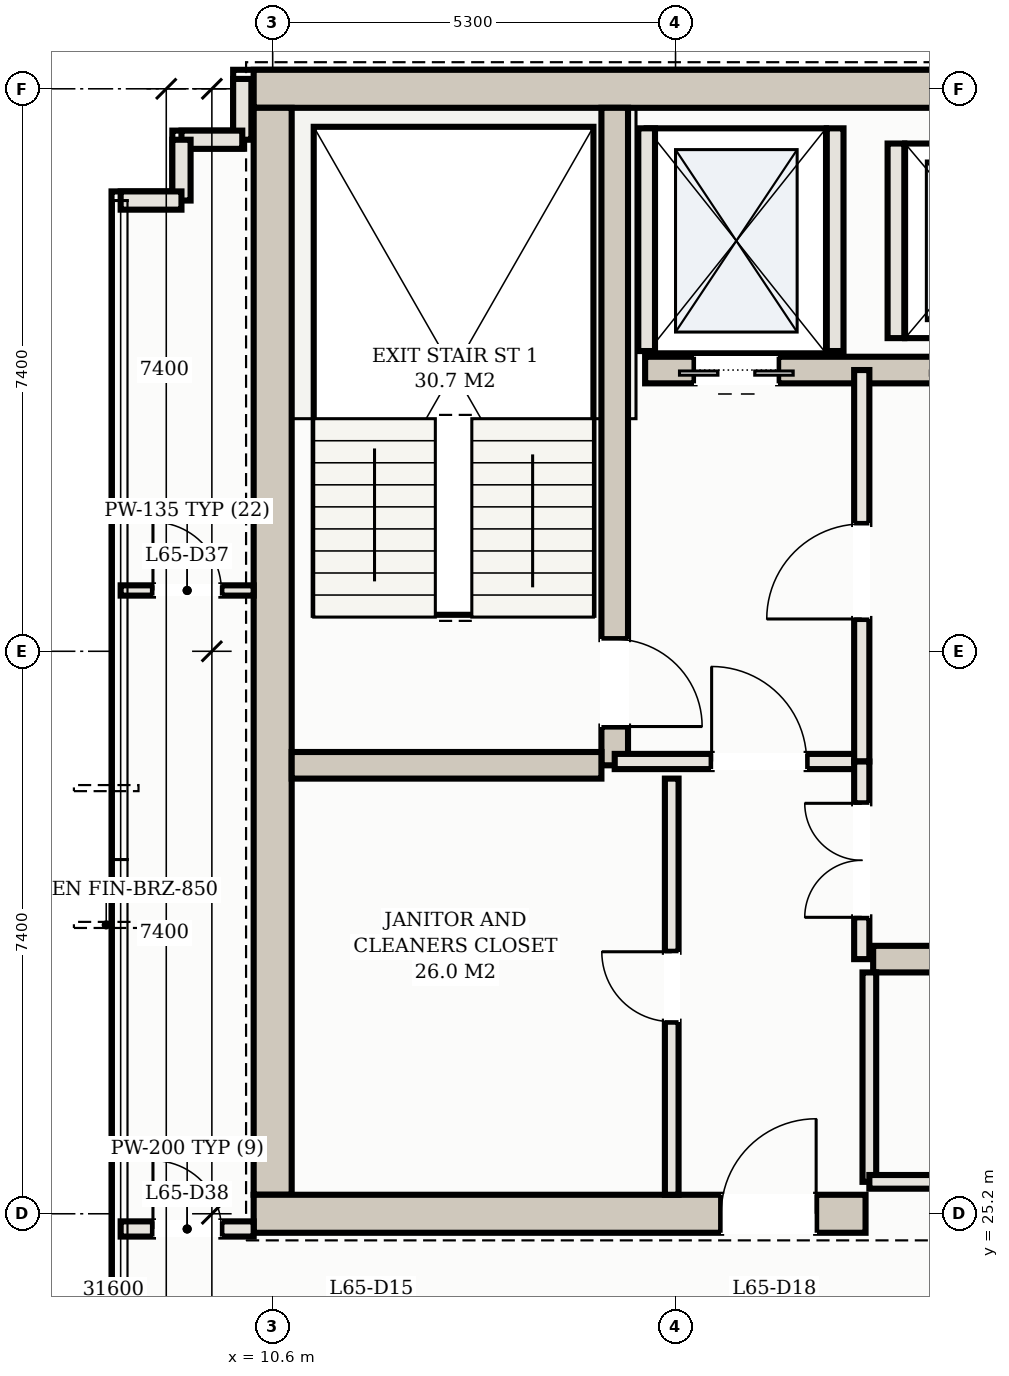
"""IFC4 building model, lengths in metres.
Left out: names, types, materials, properties, quantities, classifications, styles, units other than length and angle.
Written with IfcOpenShell. Run it as: python <this file> out.ifc"""

import sys

from ifc_helpers import new_model, si_unit, direction, frame, frame_2d, origin, place, context, subcontext, project, spatial, rectangle, extrude, element, fill, save


model = new_model("IFC4")
c1 = context("Model", 3, precision=1e-05, world=origin(), true_north=direction((0.0, 1.0)))
c2 = subcontext(c1, "Body", "Model", "MODEL_VIEW")
j1 = project(units=[si_unit("LENGTHUNIT", "METRE"), si_unit("PLANEANGLEUNIT", "RADIAN")], contexts=[c1])
p1 = place(None, origin())
s1 = spatial("IfcSite", under=j1, at=p1, CompositionType="ELEMENT")
p2 = place(p1, origin())
s2 = spatial("IfcBuilding", under=s1, at=p2, CompositionType="ELEMENT")
p3 = place(p2, frame((0.0, 0.0, 236.3)))
s3 = spatial("IfcBuildingStorey", under=s2, at=p3, CompositionType="ELEMENT", Elevation=236.3)
p4 = place(p3, frame((10.35, 40.0, 0.0), z_axis=(0.0, 0.0, 1.0), x_axis=(1.0, 0.0, 0.0)))
e1 = element("IfcWall", 1, at=p4, inside=s3, PredefinedType="SHEAR", context=c2, shape_type="SweptSolid", body=[
    extrude(rectangle(XDim=32.3, YDim=0.5, at=frame_2d((16.15, 0.0))), origin(), (0.0, 0.0, 1.0), 3.11),
])
p5 = place(p3, frame((10.6, 25.45, 0.0), z_axis=(0.0, 0.0, 1.0), x_axis=(0.0, 1.0, 0.0)))
e2 = element("IfcWall", 2, at=p5, inside=s3, PredefinedType="SHEAR", context=c2, shape_type="SweptSolid", body=[
    extrude(rectangle(XDim=14.3, YDim=0.5, at=frame_2d((7.15, 0.0))), origin(), (0.0, 0.0, 1.0), 3.11),
])
p6 = place(p3, frame((10.35, 25.2, 0.0), z_axis=(0.0, 0.0, 1.0), x_axis=(1.0, 0.0, 0.0)))
e3 = element("IfcWall", 3, at=p6, inside=s3, PredefinedType="SHEAR", context=c2, shape_type="SweptSolid", body=[
    extrude(rectangle(XDim=8.05, YDim=0.5, at=frame_2d((4.025, 0.0))), origin(), (0.0, 0.0, 1.0), 3.11),
])
p7 = place(p6, frame((6.15, 0.0, 0.0)))
e4 = element("IfcOpeningElement", 4, at=p7, cuts=e3, PredefinedType="OPENING", context=c2, shape_type="SweptSolid", body=[
    extrude(rectangle(XDim=1.25, YDim=2.2, at=frame_2d((0.625, 1.1))), frame((0.0, 0.26, 0.0), z_axis=(0.0, -1.0, 0.0), x_axis=(1.0, 0.0, 0.0)), (0.0, 0.0, 1.0), 0.52),
])
p8 = place(p3, frame((15.1, 31.1, 0.0), z_axis=(0.0, 0.0, 1.0), x_axis=(0.0, 1.0, 0.0)))
e5 = element("IfcWall", 5, at=p8, inside=s3, PredefinedType="SHEAR", context=c2, shape_type="SweptSolid", body=[
    extrude(rectangle(XDim=8.65, YDim=0.35, at=frame_2d((4.325, 0.0))), origin(), (0.0, 0.0, 1.0), 3.11),
])
p9 = place(p8, frame((0.51, 0.0, 0.0)))
e6 = element("IfcOpeningElement", 6, at=p9, cuts=e5, PredefinedType="OPENING", context=c2, shape_type="SweptSolid", body=[
    extrude(rectangle(XDim=1.15, YDim=2.2, at=frame_2d((0.575, 1.1))), frame((0.0, 0.185, 0.0), z_axis=(0.0, -1.0, 0.0), x_axis=(1.0, 0.0, 0.0)), (0.0, 0.0, 1.0), 0.37),
])
p10 = place(p3, frame((10.85, 31.1, 0.0), z_axis=(0.0, 0.0, 1.0), x_axis=(1.0, 0.0, 0.0)))
e7 = element("IfcWall", 7, at=p10, inside=s3, PredefinedType="SHEAR", context=c2, shape_type="SweptSolid", body=[
    extrude(rectangle(XDim=4.075, YDim=0.35, at=frame_2d((2.038, 0.0))), origin(), (0.0, 0.0, 1.0), 3.11),
])
p11 = place(p3, frame((15.5, 36.3, 0.0), z_axis=(0.0, 0.0, 1.0), x_axis=(1.0, 0.0, 0.0)))
e8 = element("IfcWall", 8, at=p11, inside=s3, PredefinedType="SHEAR", context=c2, shape_type="SweptSolid", body=[
    extrude(rectangle(XDim=22.0, YDim=0.35, at=frame_2d((11.0, 0.0))), origin(), (0.0, 0.0, 1.0), 3.11),
])
p12 = place(p11, frame((0.65, 0.0, 0.0)))
e9 = element("IfcOpeningElement", 9, at=p12, cuts=e8, PredefinedType="OPENING", context=c2, shape_type="SweptSolid", body=[
    extrude(rectangle(XDim=1.1, YDim=2.15, at=frame_2d((0.55, 1.075))), frame((0.0, 0.185, 0.0), z_axis=(0.0, -1.0, 0.0), x_axis=(1.0, 0.0, 0.0)), (0.0, 0.0, 1.0), 0.37),
])
p13 = place(p11, frame((20.25, 0.0, 0.0)))
e10 = element("IfcOpeningElement", 10, at=p13, cuts=e8, PredefinedType="OPENING", context=c2, shape_type="SweptSolid", body=[
    extrude(rectangle(XDim=1.1, YDim=2.15, at=frame_2d((0.55, 1.075))), frame((0.0, 0.185, 0.0), z_axis=(0.0, -1.0, 0.0), x_axis=(1.0, 0.0, 0.0)), (0.0, 0.0, 1.0), 0.37),
])
p14 = place(p11, frame((17.05, 0.0, 0.0)))
e11 = element("IfcOpeningElement", 11, at=p14, cuts=e8, PredefinedType="OPENING", context=c2, shape_type="SweptSolid", body=[
    extrude(rectangle(XDim=1.3, YDim=2.2, at=frame_2d((0.65, 1.1))), frame((0.0, 0.185, 0.0), z_axis=(0.0, -1.0, 0.0), x_axis=(1.0, 0.0, 0.0)), (0.0, 0.0, 1.0), 0.37),
])
p15 = place(p11, frame((3.95, 0.0, 0.0)))
e12 = element("IfcOpeningElement", 12, at=p15, cuts=e8, PredefinedType="OPENING", context=c2, shape_type="SweptSolid", body=[
    extrude(rectangle(XDim=1.1, YDim=2.15, at=frame_2d((0.55, 1.075))), frame((0.0, 0.185, 0.0), z_axis=(0.0, -1.0, 0.0), x_axis=(1.0, 0.0, 0.0)), (0.0, 0.0, 1.0), 0.37),
])
p16 = place(p11, frame((6.55, 0.0, 0.0)))
e13 = element("IfcOpeningElement", 13, at=p16, cuts=e8, PredefinedType="OPENING", context=c2, shape_type="SweptSolid", body=[
    extrude(rectangle(XDim=1.1, YDim=2.15, at=frame_2d((0.55, 1.075))), frame((0.0, 0.185, 0.0), z_axis=(0.0, -1.0, 0.0), x_axis=(1.0, 0.0, 0.0)), (0.0, 0.0, 1.0), 0.37),
])
p17 = place(p11, frame((9.15, 0.0, 0.0)))
e14 = element("IfcOpeningElement", 14, at=p17, cuts=e8, PredefinedType="OPENING", context=c2, shape_type="SweptSolid", body=[
    extrude(rectangle(XDim=1.1, YDim=2.15, at=frame_2d((0.55, 1.075))), frame((0.0, 0.185, 0.0), z_axis=(0.0, -1.0, 0.0), x_axis=(1.0, 0.0, 0.0)), (0.0, 0.0, 1.0), 0.37),
])
p18 = place(p3, frame((18.5, 28.55, 0.0), z_axis=(0.0, 0.0, 1.0), x_axis=(1.0, 0.0, 0.0)))
e15 = element("IfcWall", 15, at=p18, inside=s3, PredefinedType="SHEAR", context=c2, shape_type="SweptSolid", body=[
    extrude(rectangle(XDim=16.0, YDim=0.35, at=frame_2d((8.0, 0.0))), origin(), (0.0, 0.0, 1.0), 3.11),
])
for number, where, z_axis, x_axis in (
    (16, (15.52, 36.55, 0.0), (0.0, 0.0, 1.0), (0.0, 1.0, 0.0)),
    (17, (18.0, 36.55, 0.0), (0.0, 0.0, 1.0), (0.0, 1.0, 0.0)),
):
    element("IfcWall", number, at=place(p3, frame(where, z_axis=z_axis, x_axis=x_axis)), inside=s3, PredefinedType="SOLIDWALL", context=c2, shape_type="SweptSolid", body=[
        extrude(rectangle(XDim=2.93, YDim=0.22, at=frame_2d((1.465, 0.0))), origin(), (0.0, 0.0, 1.0), 3.11),
    ])
p19 = place(p3, frame((18.8, 36.72, 0.0), z_axis=(0.0, 0.0, 1.0), x_axis=(0.0, 1.0, 0.0)))
e18 = element("IfcWall", 18, at=p19, inside=s3, PredefinedType="SOLIDWALL", context=c2, shape_type="SweptSolid", body=[
    extrude(rectangle(XDim=2.56, YDim=0.22, at=frame_2d((1.28, 0.0))), origin(), (0.0, 0.0, 1.0), 3.11),
])
p20 = place(p3, frame((10.2, 40.13, 0.0), z_axis=(0.0, 0.0, 1.0), x_axis=(0.0, -1.0, 0.0)))
e19 = element("IfcWall", 19, at=p20, inside=s3, PredefinedType="SOLIDWALL", context=c2, shape_type="SweptSolid", body=[
    extrude(rectangle(XDim=0.8, YDim=0.24, at=frame_2d((0.4, 0.0))), origin(), (0.0, 0.0, 1.0), 3.11),
])
for number, where, z_axis, x_axis in (
    (20, (10.2, 39.33, 0.0), (0.0, 0.0, 1.0), (-1.0, 0.0, 0.0)),
    (21, (9.4, 39.33, 0.0), (0.0, 0.0, 1.0), (0.0, -1.0, 0.0)),
):
    element("IfcWall", number, at=place(p3, frame(where, z_axis=z_axis, x_axis=x_axis)), inside=s3, PredefinedType="SOLIDWALL", context=c2, shape_type="SweptSolid", body=[
        extrude(rectangle(XDim=0.8, YDim=0.24, at=frame_2d((0.4, 0.0))), origin(), (0.0, 0.0, 1.0), 3.11),
    ])
p21 = place(p3, frame((9.4, 38.53, 0.0), z_axis=(0.0, 0.0, 1.0), x_axis=(-1.0, 0.0, 0.0)))
e22 = element("IfcWall", 22, at=p21, inside=s3, PredefinedType="SOLIDWALL", context=c2, shape_type="SweptSolid", body=[
    extrude(rectangle(XDim=0.8, YDim=0.24, at=frame_2d((0.4, 0.0))), origin(), (0.0, 0.0, 1.0), 3.11),
])
p22 = place(p3, frame((15.1, 31.15, 0.0), z_axis=(0.0, 0.0, 1.0), x_axis=(1.0, 0.0, 0.0)))
e23 = element("IfcWall", 23, at=p22, inside=s3, PredefinedType="PARTITIONING", context=c2, shape_type="SweptSolid", body=[
    extrude(rectangle(XDim=3.25, YDim=0.2, at=frame_2d((1.625, 0.0))), origin(), (0.0, 0.0, 1.0), 2.45),
])
p23 = place(p22, frame((1.275, 0.0, 0.0)))
e24 = element("IfcOpeningElement", 24, at=p23, cuts=e23, PredefinedType="OPENING", context=c2, shape_type="SweptSolid", body=[
    extrude(rectangle(XDim=1.25, YDim=2.2, at=frame_2d((0.625, 1.1))), frame((0.0, 0.11, 0.0), z_axis=(0.0, -1.0, 0.0), x_axis=(1.0, 0.0, 0.0)), (0.0, 0.0, 1.0), 0.22),
])
p24 = place(p3, frame((18.35, 31.15, 0.0), z_axis=(0.0, 0.0, 1.0), x_axis=(0.0, 1.0, 0.0)))
e25 = element("IfcWall", 25, at=p24, inside=s3, PredefinedType="PARTITIONING", context=c2, shape_type="SweptSolid", body=[
    extrude(rectangle(XDim=5.15, YDim=0.2, at=frame_2d((2.575, 0.0))), origin(), (0.0, 0.0, 1.0), 2.45),
])
p25 = place(p24, frame((1.875, 0.0, 0.0)))
e26 = element("IfcOpeningElement", 26, at=p25, cuts=e25, PredefinedType="OPENING", context=c2, shape_type="SweptSolid", body=[
    extrude(rectangle(XDim=1.25, YDim=2.2, at=frame_2d((0.625, 1.1))), frame((0.0, 0.11, 0.0), z_axis=(0.0, -1.0, 0.0), x_axis=(1.0, 0.0, 0.0)), (0.0, 0.0, 1.0), 0.22),
])
p26 = place(p3, frame((15.85, 25.45, 0.0), z_axis=(0.0, 0.0, 1.0), x_axis=(0.0, 1.0, 0.0)))
e27 = element("IfcWall", 27, at=p26, inside=s3, PredefinedType="PARTITIONING", context=c2, shape_type="SweptSolid", body=[
    extrude(rectangle(XDim=5.475, YDim=0.18, at=frame_2d((2.738, 0.0))), origin(), (0.0, 0.0, 1.0), 2.45),
])
p27 = place(p26, frame((2.277, 0.0, 0.0)))
e28 = element("IfcOpeningElement", 28, at=p27, cuts=e27, PredefinedType="OPENING", context=c2, shape_type="SweptSolid", body=[
    extrude(rectangle(XDim=0.92, YDim=2.15, at=frame_2d((0.46, 1.075))), frame((0.0, 0.1, 0.0), z_axis=(0.0, -1.0, 0.0), x_axis=(1.0, 0.0, 0.0)), (0.0, 0.0, 1.0), 0.2),
])
p28 = place(p3, frame((18.35, 28.55, 0.0), z_axis=(0.0, 0.0, 1.0), x_axis=(0.0, 1.0, 0.0)))
e29 = element("IfcWall", 29, at=p28, inside=s3, PredefinedType="PARTITIONING", context=c2, shape_type="SweptSolid", body=[
    extrude(rectangle(XDim=2.6, YDim=0.2, at=frame_2d((1.3, 0.0))), origin(), (0.0, 0.0, 1.0), 2.45),
])
p29 = place(p28, frame((0.55, 0.0, 0.0)))
e30 = element("IfcOpeningElement", 30, at=p29, cuts=e29, PredefinedType="OPENING", context=c2, shape_type="SweptSolid", body=[
    extrude(rectangle(XDim=1.5, YDim=2.25, at=frame_2d((0.75, 1.125))), frame((0.0, 0.11, 0.0), z_axis=(0.0, -1.0, 0.0), x_axis=(1.0, 0.0, 0.0)), (0.0, 0.0, 1.0), 0.22),
])
p30 = place(p3, frame((18.45, 25.62, 0.0), z_axis=(0.0, 0.0, 1.0), x_axis=(0.0, 1.0, 0.0)))
e31 = element("IfcWall", 31, at=p30, inside=s3, PredefinedType="PARTITIONING", context=c2, shape_type="SweptSolid", body=[
    extrude(rectangle(XDim=2.755, YDim=0.18, at=frame_2d((1.377, 0.0))), origin(), (0.0, 0.0, 1.0), 2.45),
])
p31 = place(p3, frame((18.45, 25.62, 0.0), z_axis=(0.0, 0.0, 1.0), x_axis=(1.0, 0.0, 0.0)))
e32 = element("IfcWall", 32, at=p31, inside=s3, PredefinedType="PARTITIONING", context=c2, shape_type="SweptSolid", body=[
    extrude(rectangle(XDim=7.9, YDim=0.18, at=frame_2d((3.95, 0.0))), origin(), (0.0, 0.0, 1.0), 2.45),
])
p32 = place(p31, frame((3.34, 0.0, 0.0)))
e33 = element("IfcOpeningElement", 33, at=p32, cuts=e32, PredefinedType="OPENING", context=c2, shape_type="SweptSolid", body=[
    extrude(rectangle(XDim=0.92, YDim=2.15, at=frame_2d((0.46, 1.075))), frame((0.0, 0.1, 0.0), z_axis=(0.0, -1.0, 0.0), x_axis=(1.0, 0.0, 0.0)), (0.0, 0.0, 1.0), 0.2),
])
p33 = place(p3, frame((8.6, 25.0, 0.0), z_axis=(0.0, 0.0, 1.0), x_axis=(1.0, 0.0, 0.0)))
e34 = element("IfcWall", 34, at=p33, inside=s3, PredefinedType="PARTITIONING", context=c2, shape_type="SweptSolid", body=[
    extrude(rectangle(XDim=1.75, YDim=0.2, at=frame_2d((0.875, 0.0))), origin(), (0.0, 0.0, 1.0), 2.45),
])
p34 = place(p33, frame((0.425, 0.0, 0.0)))
e35 = element("IfcOpeningElement", 35, at=p34, cuts=e34, PredefinedType="OPENING", context=c2, shape_type="SweptSolid", body=[
    extrude(rectangle(XDim=0.9, YDim=2.15, at=frame_2d((0.45, 1.075))), frame((0.0, 0.11, 0.0), z_axis=(0.0, -1.0, 0.0), x_axis=(1.0, 0.0, 0.0)), (0.0, 0.0, 1.0), 0.22),
])
p35 = place(p3, frame((8.6, 33.4, 0.0), z_axis=(0.0, 0.0, 1.0), x_axis=(1.0, 0.0, 0.0)))
e36 = element("IfcWall", 36, at=p35, inside=s3, PredefinedType="PARTITIONING", context=c2, shape_type="SweptSolid", body=[
    extrude(rectangle(XDim=1.75, YDim=0.135, at=frame_2d((0.875, 0.0))), origin(), (0.0, 0.0, 1.0), 2.45),
])
p36 = place(p35, frame((0.425, 0.0, 0.0)))
e37 = element("IfcOpeningElement", 37, at=p36, cuts=e36, PredefinedType="OPENING", context=c2, shape_type="SweptSolid", body=[
    extrude(rectangle(XDim=0.9, YDim=2.15, at=frame_2d((0.45, 1.075))), frame((0.0, 0.078, 0.0), z_axis=(0.0, -1.0, 0.0), x_axis=(1.0, 0.0, 0.0)), (0.0, 0.0, 1.0), 0.155),
])
p37 = place(p12, frame((1.1, 0.0, 0.0), z_axis=(0.0, 0.0, 1.0), x_axis=(-1.0, 0.0, 0.0)))
e38 = element("IfcDoor", 38, at=p37, inside=s3, OperationType="DOUBLE_DOOR_SLIDING", PredefinedType="DOOR", context=c2, shape_type="SweptSolid", body=[
    extrude(rectangle(XDim=1.1, YDim=2.15, at=frame_2d((0.55, 1.075))), frame((0.0, 0.025, 0.0), z_axis=(0.0, -1.0, 0.0), x_axis=(1.0, 0.0, 0.0)), (0.0, 0.0, 1.0), 0.05),
])
fill(e9, e38)
p38 = place(p7, origin())
e39 = element("IfcDoor", 39, at=p38, inside=s3, OperationType="SINGLE_SWING_RIGHT", PredefinedType="DOOR", context=c2, shape_type="SweptSolid", body=[
    extrude(rectangle(XDim=1.25, YDim=2.2, at=frame_2d((0.625, 1.1))), frame((0.0, 0.025, 0.0), z_axis=(0.0, -1.0, 0.0), x_axis=(1.0, 0.0, 0.0)), (0.0, 0.0, 1.0), 0.05),
])
fill(e4, e39)
p39 = place(p23, origin())
e40 = element("IfcDoor", 40, at=p39, inside=s3, OperationType="SINGLE_SWING_LEFT", PredefinedType="DOOR", context=c2, shape_type="SweptSolid", body=[
    extrude(rectangle(XDim=1.25, YDim=2.2, at=frame_2d((0.625, 1.1))), frame((0.0, 0.025, 0.0), z_axis=(0.0, -1.0, 0.0), x_axis=(1.0, 0.0, 0.0)), (0.0, 0.0, 1.0), 0.05),
])
fill(e24, e40)
p40 = place(p25, origin())
e41 = element("IfcDoor", 41, at=p40, inside=s3, OperationType="SINGLE_SWING_LEFT", PredefinedType="DOOR", context=c2, shape_type="SweptSolid", body=[
    extrude(rectangle(XDim=1.25, YDim=2.2, at=frame_2d((0.625, 1.1))), frame((0.0, 0.025, 0.0), z_axis=(0.0, -1.0, 0.0), x_axis=(1.0, 0.0, 0.0)), (0.0, 0.0, 1.0), 0.05),
])
fill(e26, e41)
p41 = place(p9, frame((1.15, 0.0, 0.0), z_axis=(0.0, 0.0, 1.0), x_axis=(-1.0, 0.0, 0.0)))
e42 = element("IfcDoor", 42, at=p41, inside=s3, OperationType="SINGLE_SWING_RIGHT", PredefinedType="DOOR", context=c2, shape_type="SweptSolid", body=[
    extrude(rectangle(XDim=1.15, YDim=2.2, at=frame_2d((0.575, 1.1))), frame((0.0, 0.025, 0.0), z_axis=(0.0, -1.0, 0.0), x_axis=(1.0, 0.0, 0.0)), (0.0, 0.0, 1.0), 0.05),
])
fill(e6, e42)
p42 = place(p27, origin())
e43 = element("IfcDoor", 43, at=p42, inside=s3, OperationType="SINGLE_SWING_RIGHT", PredefinedType="DOOR", context=c2, shape_type="SweptSolid", body=[
    extrude(rectangle(XDim=0.92, YDim=2.15, at=frame_2d((0.46, 1.075))), frame((0.0, 0.025, 0.0), z_axis=(0.0, -1.0, 0.0), x_axis=(1.0, 0.0, 0.0)), (0.0, 0.0, 1.0), 0.05),
])
fill(e28, e43)
p43 = place(p29, origin())
e44 = element("IfcDoor", 44, at=p43, inside=s3, OperationType="DOUBLE_DOOR_SINGLE_SWING", PredefinedType="DOOR", context=c2, shape_type="SweptSolid", body=[
    extrude(rectangle(XDim=1.5, YDim=2.25, at=frame_2d((0.75, 1.125))), frame((0.0, 0.025, 0.0), z_axis=(0.0, -1.0, 0.0), x_axis=(1.0, 0.0, 0.0)), (0.0, 0.0, 1.0), 0.05),
])
fill(e30, e44)
p44 = place(p36, origin())
e45 = element("IfcDoor", 45, at=p44, inside=s3, OperationType="SINGLE_SWING_LEFT", PredefinedType="DOOR", context=c2, shape_type="SweptSolid", body=[
    extrude(rectangle(XDim=0.9, YDim=2.15, at=frame_2d((0.45, 1.075))), frame((0.0, 0.025, 0.0), z_axis=(0.0, -1.0, 0.0), x_axis=(1.0, 0.0, 0.0)), (0.0, 0.0, 1.0), 0.05),
])
fill(e37, e45)
p45 = place(p34, origin())
e46 = element("IfcDoor", 46, at=p45, inside=s3, OperationType="SINGLE_SWING_LEFT", PredefinedType="DOOR", context=c2, shape_type="SweptSolid", body=[
    extrude(rectangle(XDim=0.9, YDim=2.15, at=frame_2d((0.45, 1.075))), frame((0.0, 0.025, 0.0), z_axis=(0.0, -1.0, 0.0), x_axis=(1.0, 0.0, 0.0)), (0.0, 0.0, 1.0), 0.05),
])
fill(e35, e46)
save(model, sys.argv[1])
